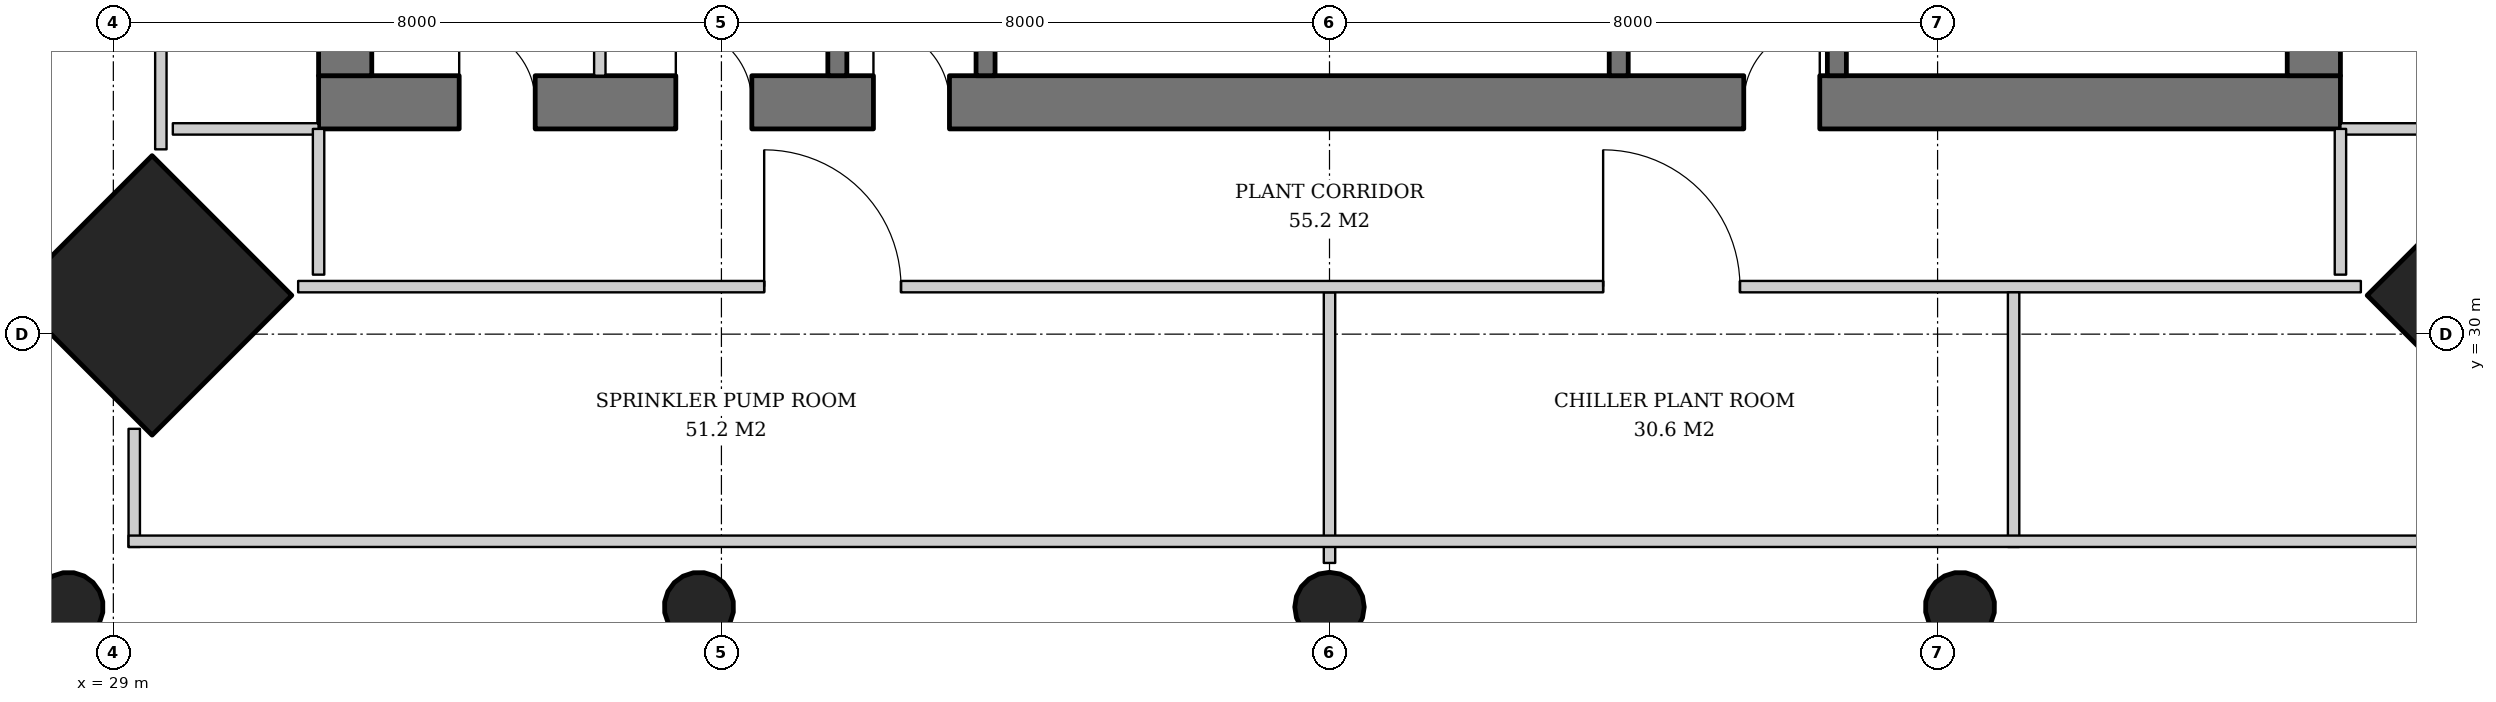
"""IFC4 building model, lengths in metres.
Left out: names, types, materials, properties, quantities, classifications, styles, units other than length and angle.
Written with IfcOpenShell. Run it as: python <this file> out.ifc"""

import sys

from ifc_helpers import new_model, si_unit, direction, frame, frame_2d, origin, origin_2d, place, context, subcontext, project, spatial, rectangle, hollow_circle, extrude, element, fill, save


model = new_model("IFC4")
c1 = context("Model", 3, precision=1e-05, world=origin(), true_north=direction((0.0, 1.0)))
c2 = subcontext(c1, "Body", "Model", "MODEL_VIEW")
j1 = project(units=[si_unit("LENGTHUNIT", "METRE"), si_unit("PLANEANGLEUNIT", "RADIAN")], contexts=[c1])
p1 = place(None, origin())
s1 = spatial("IfcSite", under=j1, at=p1, CompositionType="ELEMENT")
p2 = place(p1, origin())
s2 = spatial("IfcBuilding", under=s1, at=p2, CompositionType="ELEMENT")
p3 = place(p2, frame((0.0, 0.0, 157.8)))
s3 = spatial("IfcBuildingStorey", under=s2, at=p3, CompositionType="ELEMENT", Elevation=157.8)
for number, where, z_axis, x_axis in (
    (1, (29.471, 30.471, 0.0), (0.032, 0.032, 0.999), (-0.707, 0.707, 0.0)),
    (2, (60.529, 30.471, 0.0), (-0.032, 0.032, 0.999), (-0.707, -0.707, 0.0)),
):
    element("IfcColumn", number, at=place(p3, frame(where, z_axis=z_axis, x_axis=x_axis)), inside=s3, PredefinedType="COLUMN", context=c2, shape_type="SweptSolid", body=[
        extrude(rectangle(XDim=2.6, YDim=2.6, at=origin_2d()), origin(), (0.0, 0.0, 1.0), 3.804),
    ])
p4 = place(p3, frame((28.371, 26.371, 0.0), z_axis=(0.031962158256, 0.031962158256, 0.998977898093), x_axis=(-0.707106781187, 0.707106781187, 0.0)))
e3 = element("IfcColumn", 3, at=p4, inside=s3, PredefinedType="COLUMN", context=c2, shape_type="SweptSolid", body=[
    extrude(hollow_circle(Radius=0.457, WallThickness=0.03, at=origin_2d()), origin(), (0.0, 0.0, 1.0), 3.804),
])
p5 = place(p3, frame((36.686, 26.371, 0.0), z_axis=(0.015923015547, 0.031974442509, 0.999361842679), x_axis=(-0.895145027055, 0.445775033553, 0.0)))
e4 = element("IfcColumn", 4, at=p5, inside=s3, PredefinedType="COLUMN", context=c2, shape_type="SweptSolid", body=[
    extrude(hollow_circle(Radius=0.457, WallThickness=0.03, at=origin_2d()), origin(), (0.0, 0.0, 1.0), 3.802),
])
p6 = place(p3, frame((45.0, 26.371, 0.0), z_axis=(0.0, 0.031978496719, 0.999488557087), x_axis=(-1.0, 0.0, 0.0)))
e5 = element("IfcColumn", 5, at=p6, inside=s3, PredefinedType="COLUMN", context=c2, shape_type="SweptSolid", body=[
    extrude(hollow_circle(Radius=0.457, WallThickness=0.03, at=origin_2d()), origin(), (0.0, 0.0, 1.0), 3.802),
])
p7 = place(p3, frame((53.314, 26.371, 0.0), z_axis=(-0.015923015547, 0.031974442509, 0.999361842679), x_axis=(-0.895145027055, -0.445775033553, 0.0)))
e6 = element("IfcColumn", 6, at=p7, inside=s3, PredefinedType="COLUMN", context=c2, shape_type="SweptSolid", body=[
    extrude(hollow_circle(Radius=0.457, WallThickness=0.03, at=origin_2d()), origin(), (0.0, 0.0, 1.0), 3.802),
])
p8 = place(p3, frame((31.7, 33.05, 0.0), z_axis=(0.0, 0.0, 1.0), x_axis=(1.0, 0.0, 0.0)))
e7 = element("IfcWall", 7, at=p8, inside=s3, PredefinedType="SHEAR", context=c2, shape_type="SweptSolid", body=[
    extrude(rectangle(XDim=26.6, YDim=0.7, at=frame_2d((13.3, 0.0))), origin(), (0.0, 0.0, 1.0), 3.8),
])
p9 = place(p8, frame((7.3, 0.0, 0.0)))
e8 = element("IfcOpeningElement", 8, at=p9, cuts=e7, PredefinedType="OPENING", context=c2, shape_type="SweptSolid", body=[
    extrude(rectangle(XDim=1.0, YDim=2.1, at=frame_2d((0.5, 1.05))), frame((0.0, 0.36, 0.0), z_axis=(0.0, -1.0, 0.0), x_axis=(1.0, 0.0, 0.0)), (0.0, 0.0, 1.0), 0.72),
])
p10 = place(p8, frame((18.75, 0.0, 0.0)))
e9 = element("IfcOpeningElement", 9, at=p10, cuts=e7, PredefinedType="OPENING", context=c2, shape_type="SweptSolid", body=[
    extrude(rectangle(XDim=1.0, YDim=2.1, at=frame_2d((0.5, 1.05))), frame((0.0, 0.36, 0.0), z_axis=(0.0, -1.0, 0.0), x_axis=(1.0, 0.0, 0.0)), (0.0, 0.0, 1.0), 0.72),
])
p11 = place(p8, frame((1.85, 0.0, 0.0)))
e10 = element("IfcOpeningElement", 10, at=p11, cuts=e7, PredefinedType="OPENING", context=c2, shape_type="SweptSolid", body=[
    extrude(rectangle(XDim=1.0, YDim=2.1, at=frame_2d((0.5, 1.05))), frame((0.0, 0.36, 0.0), z_axis=(0.0, -1.0, 0.0), x_axis=(1.0, 0.0, 0.0)), (0.0, 0.0, 1.0), 0.72),
])
p12 = place(p8, frame((4.7, 0.0, 0.0)))
e11 = element("IfcOpeningElement", 11, at=p12, cuts=e7, PredefinedType="OPENING", context=c2, shape_type="SweptSolid", body=[
    extrude(rectangle(XDim=1.0, YDim=2.1, at=frame_2d((0.5, 1.05))), frame((0.0, 0.36, 0.0), z_axis=(0.0, -1.0, 0.0), x_axis=(1.0, 0.0, 0.0)), (0.0, 0.0, 1.0), 0.72),
])
p13 = place(p3, frame((32.05, 33.4, 0.0), z_axis=(0.0, 0.0, 1.0), x_axis=(0.0, 1.0, 0.0)))
e12 = element("IfcWall", 12, at=p13, inside=s3, PredefinedType="SHEAR", context=c2, shape_type="SweptSolid", body=[
    extrude(rectangle(XDim=25.2, YDim=0.7, at=frame_2d((12.6, 0.0))), origin(), (0.0, 0.0, 1.0), 3.8),
])
p14 = place(p13, frame((11.7, 0.0, 0.0)))
e13 = element("IfcOpeningElement", 13, at=p14, cuts=e12, PredefinedType="OPENING", context=c2, shape_type="SweptSolid", body=[
    extrude(rectangle(XDim=1.8, YDim=2.4, at=frame_2d((0.9, 1.2))), frame((0.0, 0.36, 0.0), z_axis=(0.0, -1.0, 0.0), x_axis=(1.0, 0.0, 0.0)), (0.0, 0.0, 1.0), 0.72),
])
p15 = place(p13, frame((3.575, 0.0, 0.0)))
e14 = element("IfcOpeningElement", 14, at=p15, cuts=e12, PredefinedType="OPENING", context=c2, shape_type="SweptSolid", body=[
    extrude(rectangle(XDim=1.0, YDim=2.1, at=frame_2d((0.5, 1.05))), frame((0.0, 0.36, 0.0), z_axis=(0.0, -1.0, 0.0), x_axis=(1.0, 0.0, 0.0)), (0.0, 0.0, 1.0), 0.72),
])
p16 = place(p13, frame((6.375, 0.0, 0.0)))
e15 = element("IfcOpeningElement", 15, at=p16, cuts=e12, PredefinedType="OPENING", context=c2, shape_type="SweptSolid", body=[
    extrude(rectangle(XDim=1.0, YDim=2.1, at=frame_2d((0.5, 1.05))), frame((0.0, 0.36, 0.0), z_axis=(0.0, -1.0, 0.0), x_axis=(1.0, 0.0, 0.0)), (0.0, 0.0, 1.0), 0.72),
])
p17 = place(p13, frame((9.1, 0.0, 0.0)))
e16 = element("IfcOpeningElement", 16, at=p17, cuts=e12, PredefinedType="OPENING", context=c2, shape_type="SweptSolid", body=[
    extrude(rectangle(XDim=1.0, YDim=2.1, at=frame_2d((0.5, 1.05))), frame((0.0, 0.36, 0.0), z_axis=(0.0, -1.0, 0.0), x_axis=(1.0, 0.0, 0.0)), (0.0, 0.0, 1.0), 0.72),
])
p18 = place(p13, frame((15.1, 0.0, 0.0)))
e17 = element("IfcOpeningElement", 17, at=p18, cuts=e12, PredefinedType="OPENING", context=c2, shape_type="SweptSolid", body=[
    extrude(rectangle(XDim=1.0, YDim=2.1, at=frame_2d((0.5, 1.05))), frame((0.0, 0.36, 0.0), z_axis=(0.0, -1.0, 0.0), x_axis=(1.0, 0.0, 0.0)), (0.0, 0.0, 1.0), 0.72),
])
p19 = place(p13, frame((17.8, 0.0, 0.0)))
e18 = element("IfcOpeningElement", 18, at=p19, cuts=e12, PredefinedType="OPENING", context=c2, shape_type="SweptSolid", body=[
    extrude(rectangle(XDim=1.0, YDim=2.1, at=frame_2d((0.5, 1.05))), frame((0.0, 0.36, 0.0), z_axis=(0.0, -1.0, 0.0), x_axis=(1.0, 0.0, 0.0)), (0.0, 0.0, 1.0), 0.72),
])
p20 = place(p3, frame((57.95, 33.4, 0.0), z_axis=(0.0, 0.0, 1.0), x_axis=(0.0, 1.0, 0.0)))
e19 = element("IfcWall", 19, at=p20, inside=s3, PredefinedType="SHEAR", context=c2, shape_type="SweptSolid", body=[
    extrude(rectangle(XDim=25.2, YDim=0.7, at=frame_2d((12.6, 0.0))), origin(), (0.0, 0.0, 1.0), 3.8),
])
p21 = place(p20, frame((11.7, 0.0, 0.0)))
e20 = element("IfcOpeningElement", 20, at=p21, cuts=e19, PredefinedType="OPENING", context=c2, shape_type="SweptSolid", body=[
    extrude(rectangle(XDim=1.8, YDim=2.4, at=frame_2d((0.9, 1.2))), frame((0.0, 0.36, 0.0), z_axis=(0.0, -1.0, 0.0), x_axis=(1.0, 0.0, 0.0)), (0.0, 0.0, 1.0), 0.72),
])
p22 = place(p3, frame((38.525, 33.4, 0.0), z_axis=(0.0, 0.0, 1.0), x_axis=(0.0, 1.0, 0.0)))
e21 = element("IfcWall", 21, at=p22, inside=s3, PredefinedType="SOLIDWALL", context=c2, shape_type="SweptSolid", body=[
    extrude(rectangle(XDim=2.7, YDim=0.25, at=frame_2d((1.35, 0.0))), origin(), (0.0, 0.0, 1.0), 3.52),
])
p23 = place(p3, frame((40.475, 33.4, 0.0), z_axis=(0.0, 0.0, 1.0), x_axis=(0.0, 1.0, 0.0)))
e22 = element("IfcWall", 22, at=p23, inside=s3, PredefinedType="SOLIDWALL", context=c2, shape_type="SweptSolid", body=[
    extrude(rectangle(XDim=2.7, YDim=0.25, at=frame_2d((1.35, 0.0))), origin(), (0.0, 0.0, 1.0), 3.52),
])
p24 = place(p23, frame((0.85, 0.0, 0.0)))
e23 = element("IfcOpeningElement", 23, at=p24, cuts=e22, PredefinedType="OPENING", context=c2, shape_type="SweptSolid", body=[
    extrude(rectangle(XDim=1.0, YDim=2.1, at=frame_2d((0.5, 1.05))), frame((0.0, 0.135, 0.0), z_axis=(0.0, -1.0, 0.0), x_axis=(1.0, 0.0, 0.0)), (0.0, 0.0, 1.0), 0.27),
])
p25 = place(p3, frame((48.805, 33.4, 0.0), z_axis=(0.0, 0.0, 1.0), x_axis=(0.0, 1.0, 0.0)))
e24 = element("IfcWall", 24, at=p25, inside=s3, PredefinedType="SOLIDWALL", context=c2, shape_type="SweptSolid", body=[
    extrude(rectangle(XDim=2.7, YDim=0.25, at=frame_2d((1.35, 0.0))), origin(), (0.0, 0.0, 1.0), 3.52),
])
p26 = place(p25, frame((0.85, 0.0, 0.0)))
e25 = element("IfcOpeningElement", 25, at=p26, cuts=e24, PredefinedType="OPENING", context=c2, shape_type="SweptSolid", body=[
    extrude(rectangle(XDim=1.0, YDim=2.1, at=frame_2d((0.5, 1.05))), frame((0.0, 0.135, 0.0), z_axis=(0.0, -1.0, 0.0), x_axis=(1.0, 0.0, 0.0)), (0.0, 0.0, 1.0), 0.27),
])
p27 = place(p3, frame((51.675, 33.4, 0.0), z_axis=(0.0, 0.0, 1.0), x_axis=(0.0, 1.0, 0.0)))
e26 = element("IfcWall", 26, at=p27, inside=s3, PredefinedType="SOLIDWALL", context=c2, shape_type="SweptSolid", body=[
    extrude(rectangle(XDim=2.7, YDim=0.25, at=frame_2d((1.35, 0.0))), origin(), (0.0, 0.0, 1.0), 3.52),
])
p28 = place(p27, frame((0.85, 0.0, 0.0)))
e27 = element("IfcOpeningElement", 27, at=p28, cuts=e26, PredefinedType="OPENING", context=c2, shape_type="SweptSolid", body=[
    extrude(rectangle(XDim=1.0, YDim=2.1, at=frame_2d((0.5, 1.05))), frame((0.0, 0.135, 0.0), z_axis=(0.0, -1.0, 0.0), x_axis=(1.0, 0.0, 0.0)), (0.0, 0.0, 1.0), 0.27),
])
p29 = place(p3, frame((35.4, 33.4, 0.0), z_axis=(0.0, 0.0, 1.0), x_axis=(0.0, 1.0, 0.0)))
e28 = element("IfcWall", 28, at=p29, inside=s3, PredefinedType="SOLIDWALL", context=c2, shape_type="SweptSolid", body=[
    extrude(rectangle(XDim=2.7, YDim=0.15, at=frame_2d((1.35, 0.0))), origin(), (0.0, 0.0, 1.0), 3.52),
])
for number, where, z_axis, x_axis in (
    (29, (58.3, 32.7, 0.0), (0.0, 0.0, 1.0), (1.0, 0.0, 0.0)),
    (30, (31.7, 32.7, 0.0), (0.0, 0.0, 1.0), (-1.0, 0.0, 0.0)),
):
    element("IfcWall", number, at=place(p3, frame(where, z_axis=z_axis, x_axis=x_axis)), inside=s3, PredefinedType="PARTITIONING", context=c2, shape_type="SweptSolid", body=[
        extrude(rectangle(XDim=1.917, YDim=0.15, at=frame_2d((0.958, 0.0))), origin(), (0.0, 0.0, 1.0), 3.52),
    ])
p30 = place(p3, frame((29.625, 59.569, 0.0), z_axis=(0.0, 0.0, 1.0), x_axis=(0.0, -1.0, 0.0)))
e31 = element("IfcWall", 31, at=p30, inside=s3, PredefinedType="SOLIDWALL", context=c2, shape_type="SweptSolid", body=[
    extrude(rectangle(XDim=27.137, YDim=0.15, at=frame_2d((13.569, 0.0))), origin(), (0.0, 0.0, 1.0), 2.706),
])
p31 = place(p30, frame((6.131, 0.0, 0.0)))
e32 = element("IfcOpeningElement", 32, at=p31, cuts=e31, PredefinedType="OPENING", context=c2, shape_type="SweptSolid", body=[
    extrude(rectangle(XDim=1.8, YDim=2.4, at=frame_2d((0.9, 1.2))), frame((0.0, 0.085, 0.0), z_axis=(0.0, -1.0, 0.0), x_axis=(1.0, 0.0, 0.0)), (0.0, 0.0, 1.0), 0.17),
])
p32 = place(p30, frame((17.169, 0.0, 0.0)))
e33 = element("IfcOpeningElement", 33, at=p32, cuts=e31, PredefinedType="OPENING", context=c2, shape_type="SweptSolid", body=[
    extrude(rectangle(XDim=1.8, YDim=2.4, at=frame_2d((0.9, 1.2))), frame((0.0, 0.085, 0.0), z_axis=(0.0, -1.0, 0.0), x_axis=(1.0, 0.0, 0.0)), (0.0, 0.0, 1.0), 0.17),
])
for number, where, z_axis, x_axis in (
    (34, (58.3, 32.7, 0.0), (0.0, 0.0, 1.0), (0.0, -1.0, 0.0)),
    (35, (31.7, 32.7, 0.0), (0.0, 0.0, 1.0), (0.0, -1.0, 0.0)),
):
    element("IfcWall", number, at=place(p3, frame(where, z_axis=z_axis, x_axis=x_axis)), inside=s3, PredefinedType="PARTITIONING", context=c2, shape_type="SweptSolid", body=[
        extrude(rectangle(XDim=1.917, YDim=0.15, at=frame_2d((0.958, 0.0))), origin(), (0.0, 0.0, 1.0), 3.52),
    ])
p33 = place(p3, frame((45.0, 30.55, 0.0), z_axis=(0.0, 0.0, 1.0), x_axis=(0.0, -1.0, 0.0)))
e36 = element("IfcWall", 36, at=p33, inside=s3, PredefinedType="SOLIDWALL", context=c2, shape_type="SweptSolid", body=[
    extrude(rectangle(XDim=3.56, YDim=0.15, at=frame_2d((1.78, 0.0))), origin(), (0.0, 0.0, 1.0), 3.52),
])
p34 = place(p3, frame((31.431, 30.625, 0.0), z_axis=(0.0, 0.0, 1.0), x_axis=(1.0, 0.0, 0.0)))
e37 = element("IfcWall", 37, at=p34, inside=s3, PredefinedType="SOLIDWALL", context=c2, shape_type="SweptSolid", body=[
    extrude(rectangle(XDim=27.137, YDim=0.15, at=frame_2d((13.569, 0.0))), origin(), (0.0, 0.0, 1.0), 2.706),
])
p35 = place(p34, frame((6.131, 0.0, 0.0)))
e38 = element("IfcOpeningElement", 38, at=p35, cuts=e37, PredefinedType="OPENING", context=c2, shape_type="SweptSolid", body=[
    extrude(rectangle(XDim=1.8, YDim=2.4, at=frame_2d((0.9, 1.2))), frame((0.0, 0.085, 0.0), z_axis=(0.0, -1.0, 0.0), x_axis=(1.0, 0.0, 0.0)), (0.0, 0.0, 1.0), 0.17),
])
p36 = place(p34, frame((17.169, 0.0, 0.0)))
e39 = element("IfcOpeningElement", 39, at=p36, cuts=e37, PredefinedType="OPENING", context=c2, shape_type="SweptSolid", body=[
    extrude(rectangle(XDim=1.8, YDim=2.4, at=frame_2d((0.9, 1.2))), frame((0.0, 0.085, 0.0), z_axis=(0.0, -1.0, 0.0), x_axis=(1.0, 0.0, 0.0)), (0.0, 0.0, 1.0), 0.17),
])
p37 = place(p3, frame((54.0, 30.55, 0.0), z_axis=(0.0, 0.0, 1.0), x_axis=(0.0, -1.0, 0.0)))
e40 = element("IfcWall", 40, at=p37, inside=s3, PredefinedType="SOLIDWALL", context=c2, shape_type="SweptSolid", body=[
    extrude(rectangle(XDim=3.35, YDim=0.15, at=frame_2d((1.675, 0.0))), origin(), (0.0, 0.0, 1.0), 3.52),
])
p38 = place(p3, frame((29.275, 27.2, 0.0), z_axis=(0.0, 0.0, 1.0), x_axis=(0.0, 1.0, 0.0)))
e41 = element("IfcWall", 41, at=p38, inside=s3, PredefinedType="PARTITIONING", context=c2, shape_type="SweptSolid", body=[
    extrude(rectangle(XDim=1.554, YDim=0.15, at=frame_2d((0.777, 0.0))), origin(), (0.0, 0.0, 1.0), 2.92),
])
p39 = place(p3, frame((60.8, 27.275, 0.0), z_axis=(0.0, 0.0, 1.0), x_axis=(-1.0, 0.0, 0.0)))
e42 = element("IfcWall", 42, at=p39, inside=s3, PredefinedType="PARTITIONING", context=c2, shape_type="SweptSolid", body=[
    extrude(rectangle(XDim=31.6, YDim=0.15, at=frame_2d((15.8, 0.0))), origin(), (0.0, 0.0, 1.0), 2.706),
])
p40 = place(p9, origin())
e43 = element("IfcDoor", 43, at=p40, inside=s3, OperationType="SINGLE_SWING_LEFT", PredefinedType="DOOR", context=c2, shape_type="SweptSolid", body=[
    extrude(rectangle(XDim=1.0, YDim=2.1, at=frame_2d((0.5, 1.05))), frame((0.0, 0.025, 0.0), z_axis=(0.0, -1.0, 0.0), x_axis=(1.0, 0.0, 0.0)), (0.0, 0.0, 1.0), 0.05),
])
fill(e8, e43)
p41 = place(p10, origin())
e44 = element("IfcDoor", 44, at=p41, inside=s3, OperationType="SINGLE_SWING_RIGHT", PredefinedType="DOOR", context=c2, shape_type="SweptSolid", body=[
    extrude(rectangle(XDim=1.0, YDim=2.1, at=frame_2d((0.5, 1.05))), frame((0.0, 0.025, 0.0), z_axis=(0.0, -1.0, 0.0), x_axis=(1.0, 0.0, 0.0)), (0.0, 0.0, 1.0), 0.05),
])
fill(e9, e44)
p42 = place(p11, origin())
e45 = element("IfcDoor", 45, at=p42, inside=s3, OperationType="SINGLE_SWING_LEFT", PredefinedType="DOOR", context=c2, shape_type="SweptSolid", body=[
    extrude(rectangle(XDim=1.0, YDim=2.1, at=frame_2d((0.5, 1.05))), frame((0.0, 0.34, 0.0), z_axis=(0.0, -1.0, 0.0), x_axis=(1.0, 0.0, 0.0)), (0.0, 0.0, 1.0), 0.05),
])
fill(e10, e45)
p43 = place(p12, origin())
e46 = element("IfcDoor", 46, at=p43, inside=s3, OperationType="SINGLE_SWING_LEFT", PredefinedType="DOOR", context=c2, shape_type="SweptSolid", body=[
    extrude(rectangle(XDim=1.0, YDim=2.1, at=frame_2d((0.5, 1.05))), frame((0.0, 0.34, 0.0), z_axis=(0.0, -1.0, 0.0), x_axis=(1.0, 0.0, 0.0)), (0.0, 0.0, 1.0), 0.05),
])
fill(e11, e46)
p44 = place(p35, origin())
e47 = element("IfcDoor", 47, at=p44, inside=s3, OperationType="DOUBLE_DOOR_SINGLE_SWING", PredefinedType="DOOR", context=c2, shape_type="SweptSolid", body=[
    extrude(rectangle(XDim=1.8, YDim=2.4, at=frame_2d((0.9, 1.2))), frame((0.0, 0.025, 0.0), z_axis=(0.0, -1.0, 0.0), x_axis=(1.0, 0.0, 0.0)), (0.0, 0.0, 1.0), 0.05),
])
fill(e38, e47)
p45 = place(p36, origin())
e48 = element("IfcDoor", 48, at=p45, inside=s3, OperationType="DOUBLE_DOOR_SINGLE_SWING", PredefinedType="DOOR", context=c2, shape_type="SweptSolid", body=[
    extrude(rectangle(XDim=1.8, YDim=2.4, at=frame_2d((0.9, 1.2))), frame((0.0, 0.025, 0.0), z_axis=(0.0, -1.0, 0.0), x_axis=(1.0, 0.0, 0.0)), (0.0, 0.0, 1.0), 0.05),
])
fill(e39, e48)
save(model, sys.argv[1])
